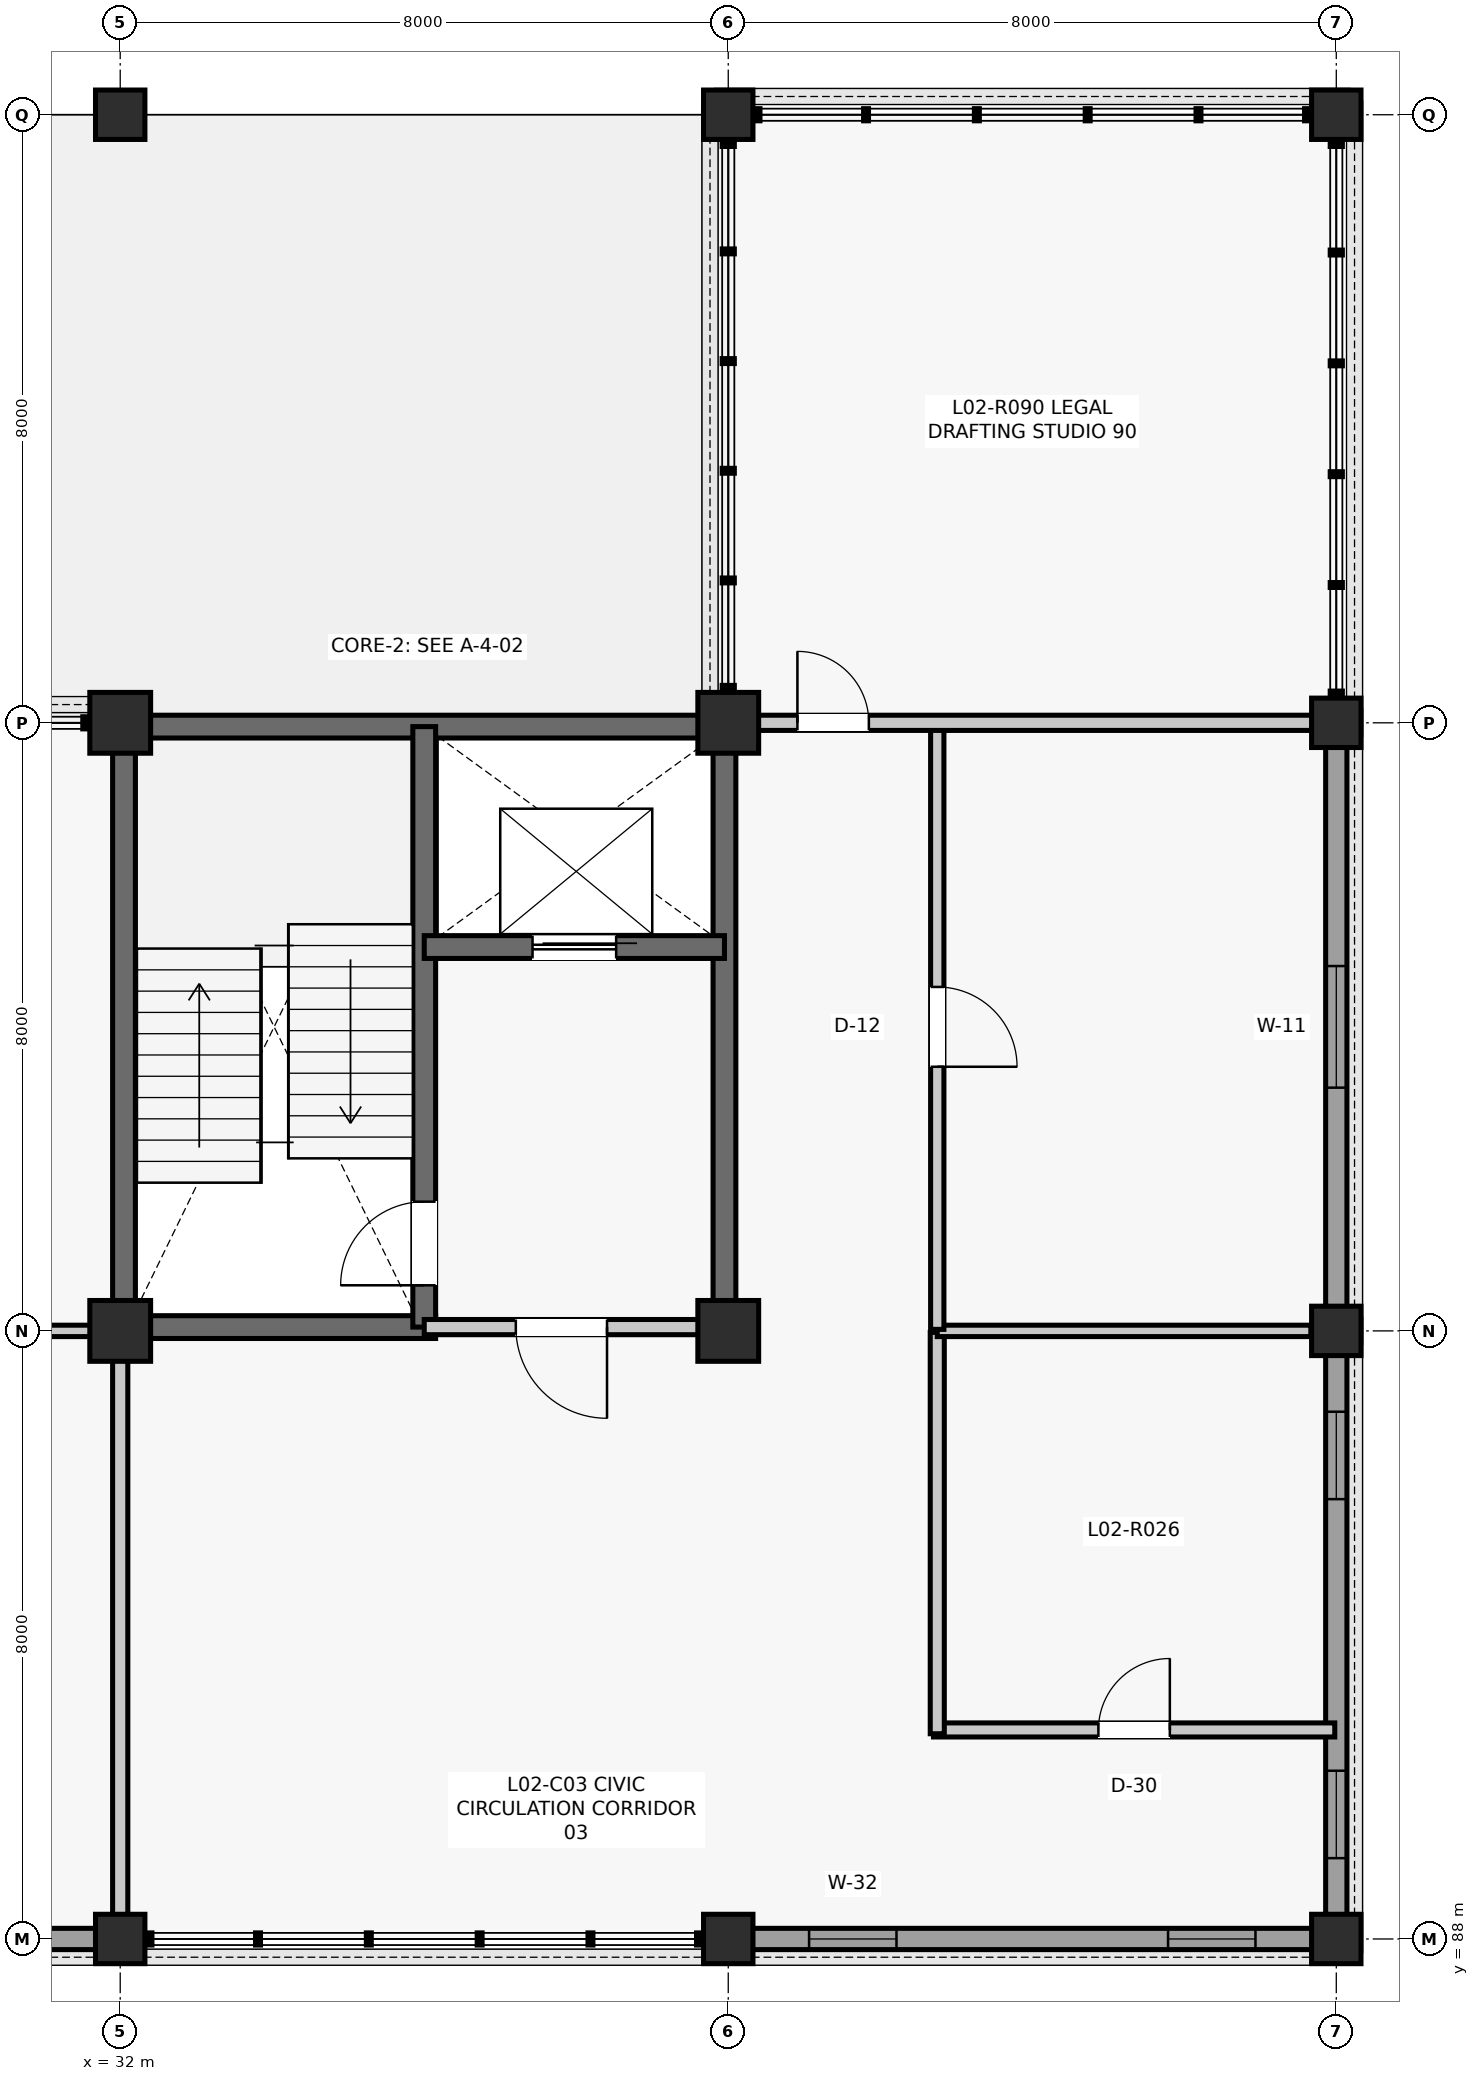
"""IFC4 building model, lengths in metres.
Left out: names, types, materials, properties, quantities, classifications, styles, units other than length and angle.
Written with IfcOpenShell. Run it as: python <this file> out.ifc"""

import sys

from ifc_helpers import new_model, si_unit, direction, frame, frame_2d, origin, origin_2d, place, context, subcontext, project, spatial, rectangle, extrude, element, fill, save


model = new_model("IFC4")
c1 = context("Model", 3, precision=1e-05, world=origin(), true_north=direction((0.0, 1.0)))
c2 = subcontext(c1, "Body", "Model", "MODEL_VIEW")
j1 = project(units=[si_unit("LENGTHUNIT", "METRE"), si_unit("PLANEANGLEUNIT", "RADIAN")], contexts=[c1])
p1 = place(None, origin())
s1 = spatial("IfcSite", under=j1, at=p1, CompositionType="ELEMENT")
p2 = place(p1, origin())
s2 = spatial("IfcBuilding", under=s1, at=p2, CompositionType="ELEMENT")
p3 = place(p2, frame((0.0, 0.0, 9.9)))
s3 = spatial("IfcBuildingStorey", under=s2, at=p3, CompositionType="ELEMENT", Elevation=9.9)
p4 = place(p3, frame((32.0, 88.0, 0.0), z_axis=(0.0, 0.0, 1.0), x_axis=(1.0, 0.0, 0.0)))
e1 = element("IfcColumn", 1, at=p4, inside=s3, PredefinedType="COLUMN", context=c2, shape_type="SweptSolid", body=[
    extrude(rectangle(XDim=0.65, YDim=0.65, at=origin_2d()), origin(), (0.0, 0.0, 1.0), 3.96),
])
for number, where, z_axis, x_axis in (
    (2, (32.0, 96.0, 0.0), (0.0, 0.0, 1.0), (1.0, 0.0, 0.0)),
    (3, (32.0, 104.0, 0.0), (0.0, 0.0, 1.0), (1.0, 0.0, 0.0)),
):
    element("IfcColumn", number, at=place(p3, frame(where, z_axis=z_axis, x_axis=x_axis)), inside=s3, PredefinedType="COLUMN", context=c2, shape_type="SweptSolid", body=[
        extrude(rectangle(XDim=0.8, YDim=0.8, at=origin_2d()), origin(), (0.0, 0.0, 1.0), 3.96),
    ])
for number, where, z_axis, x_axis in (
    (4, (32.0, 112.0, 0.0), (0.0, 0.0, 1.0), (1.0, 0.0, 0.0)),
    (5, (40.0, 88.0, 0.0), (0.0, 0.0, 1.0), (1.0, 0.0, 0.0)),
):
    element("IfcColumn", number, at=place(p3, frame(where, z_axis=z_axis, x_axis=x_axis)), inside=s3, PredefinedType="COLUMN", context=c2, shape_type="SweptSolid", body=[
        extrude(rectangle(XDim=0.65, YDim=0.65, at=origin_2d()), origin(), (0.0, 0.0, 1.0), 3.96),
    ])
for number, where, z_axis, x_axis in (
    (6, (40.0, 96.0, 0.0), (0.0, 0.0, 1.0), (1.0, 0.0, 0.0)),
    (7, (40.0, 104.0, 0.0), (0.0, 0.0, 1.0), (1.0, 0.0, 0.0)),
):
    element("IfcColumn", number, at=place(p3, frame(where, z_axis=z_axis, x_axis=x_axis)), inside=s3, PredefinedType="COLUMN", context=c2, shape_type="SweptSolid", body=[
        extrude(rectangle(XDim=0.8, YDim=0.8, at=origin_2d()), origin(), (0.0, 0.0, 1.0), 3.96),
    ])
for number, where, z_axis, x_axis in (
    (8, (40.0, 112.0, 0.0), (0.0, 0.0, 1.0), (1.0, 0.0, 0.0)),
    (9, (48.0, 88.0, 0.0), (0.0, 0.0, 1.0), (1.0, 0.0, 0.0)),
    (10, (48.0, 96.0, 0.0), (0.0, 0.0, 1.0), (1.0, 0.0, 0.0)),
    (11, (48.0, 104.0, 0.0), (0.0, 0.0, 1.0), (1.0, 0.0, 0.0)),
    (12, (48.0, 112.0, 0.0), (0.0, 0.0, 1.0), (1.0, 0.0, 0.0)),
):
    element("IfcColumn", number, at=place(p3, frame(where, z_axis=z_axis, x_axis=x_axis)), inside=s3, PredefinedType="COLUMN", context=c2, shape_type="SweptSolid", body=[
        extrude(rectangle(XDim=0.65, YDim=0.65, at=origin_2d()), origin(), (0.0, 0.0, 1.0), 3.96),
    ])
p5 = place(p3, frame((24.31, 88.0, 0.0), z_axis=(0.0, 0.0, 1.0), x_axis=(1.0, 0.0, 0.0)))
e13 = element("IfcWall", 13, at=p5, inside=s3, PredefinedType="SOLIDWALL", context=c2, shape_type="SweptSolid", body=[
    extrude(rectangle(XDim=7.38, YDim=0.28, at=frame_2d((3.69, 0.0))), origin(), (0.0, 0.0, 1.0), 3.28),
])
p6 = place(p5, frame((3.015, 0.0, 0.9)))
e14 = element("IfcOpeningElement", 14, at=p6, cuts=e13, PredefinedType="OPENING", context=c2, shape_type="SweptSolid", body=[
    extrude(rectangle(XDim=1.35, YDim=1.9, at=frame_2d((0.675, 0.95))), frame((0.0, 0.15, 0.0), z_axis=(0.0, -1.0, 0.0), x_axis=(1.0, 0.0, 0.0)), (0.0, 0.0, 1.0), 0.3),
])
p7 = place(p3, frame((40.31, 88.0, 0.0), z_axis=(0.0, 0.0, 1.0), x_axis=(1.0, 0.0, 0.0)))
e15 = element("IfcWall", 15, at=p7, inside=s3, PredefinedType="SOLIDWALL", context=c2, shape_type="SweptSolid", body=[
    extrude(rectangle(XDim=7.38, YDim=0.28, at=frame_2d((3.69, 0.0))), origin(), (0.0, 0.0, 1.0), 3.284),
])
p8 = place(p7, frame((0.753, 0.0, 0.95)))
e16 = element("IfcOpeningElement", 16, at=p8, cuts=e15, PredefinedType="OPENING", context=c2, shape_type="SweptSolid", body=[
    extrude(rectangle(XDim=1.15, YDim=1.65, at=frame_2d((0.575, 0.825))), frame((0.0, 0.15, 0.0), z_axis=(0.0, -1.0, 0.0), x_axis=(1.0, 0.0, 0.0)), (0.0, 0.0, 1.0), 0.3),
])
p9 = place(p7, frame((5.477, 0.0, 0.95)))
e17 = element("IfcOpeningElement", 17, at=p9, cuts=e15, PredefinedType="OPENING", context=c2, shape_type="SweptSolid", body=[
    extrude(rectangle(XDim=1.15, YDim=1.65, at=frame_2d((0.575, 0.825))), frame((0.0, 0.15, 0.0), z_axis=(0.0, -1.0, 0.0), x_axis=(1.0, 0.0, 0.0)), (0.0, 0.0, 1.0), 0.3),
])
p10 = place(p3, frame((48.0, 88.31, 0.0), z_axis=(0.0, 0.0, 1.0), x_axis=(0.0, 1.0, 0.0)))
e18 = element("IfcWall", 18, at=p10, inside=s3, PredefinedType="SOLIDWALL", context=c2, shape_type="SweptSolid", body=[
    extrude(rectangle(XDim=7.38, YDim=0.28, at=frame_2d((3.69, 0.0))), origin(), (0.0, 0.0, 1.0), 3.347),
])
p11 = place(p10, frame((0.753, 0.0, 0.95)))
e19 = element("IfcOpeningElement", 19, at=p11, cuts=e18, PredefinedType="OPENING", context=c2, shape_type="SweptSolid", body=[
    extrude(rectangle(XDim=1.15, YDim=1.65, at=frame_2d((0.575, 0.825))), frame((0.0, 0.15, 0.0), z_axis=(0.0, -1.0, 0.0), x_axis=(1.0, 0.0, 0.0)), (0.0, 0.0, 1.0), 0.3),
])
p12 = place(p10, frame((5.477, 0.0, 0.95)))
e20 = element("IfcOpeningElement", 20, at=p12, cuts=e18, PredefinedType="OPENING", context=c2, shape_type="SweptSolid", body=[
    extrude(rectangle(XDim=1.15, YDim=1.65, at=frame_2d((0.575, 0.825))), frame((0.0, 0.15, 0.0), z_axis=(0.0, -1.0, 0.0), x_axis=(1.0, 0.0, 0.0)), (0.0, 0.0, 1.0), 0.3),
])
p13 = place(p3, frame((48.0, 96.31, 0.0), z_axis=(0.0, 0.0, 1.0), x_axis=(0.0, 1.0, 0.0)))
e21 = element("IfcWall", 21, at=p13, inside=s3, PredefinedType="SOLIDWALL", context=c2, shape_type="SweptSolid", body=[
    extrude(rectangle(XDim=7.38, YDim=0.28, at=frame_2d((3.69, 0.0))), origin(), (0.0, 0.0, 1.0), 3.28),
])
p14 = place(p13, frame((2.89, 0.0, 0.9)))
e22 = element("IfcOpeningElement", 22, at=p14, cuts=e21, PredefinedType="OPENING", context=c2, shape_type="SweptSolid", body=[
    extrude(rectangle(XDim=1.6, YDim=2.0, at=frame_2d((0.8, 1.0))), frame((0.0, 0.15, 0.0), z_axis=(0.0, -1.0, 0.0), x_axis=(1.0, 0.0, 0.0)), (0.0, 0.0, 1.0), 0.3),
])
for number, where, z_axis, x_axis in (
    (23, (32.05, 96.29, 0.0), (0.0, 0.0, 1.0), (0.0, 1.0, 0.0)),
    (24, (32.29, 103.95, 0.0), (0.0, 0.0, 1.0), (1.0, 0.0, 0.0)),
    (25, (39.95, 96.29, 0.0), (0.0, 0.0, 1.0), (0.0, 1.0, 0.0)),
):
    element("IfcWall", number, at=place(p3, frame(where, z_axis=z_axis, x_axis=x_axis)), inside=s3, PredefinedType="SHEAR", context=c2, shape_type="SweptSolid", body=[
        extrude(rectangle(XDim=7.42, YDim=0.3, at=frame_2d((3.71, 0.0))), origin(), (0.0, 0.0, 1.0), 3.705),
    ])
p15 = place(p3, frame((32.29, 96.05, 0.0), z_axis=(0.0, 0.0, 1.0), x_axis=(1.0, 0.0, 0.0)))
e26 = element("IfcWall", 26, at=p15, inside=s3, PredefinedType="SHEAR", context=c2, shape_type="SweptSolid", body=[
    extrude(rectangle(XDim=3.86, YDim=0.3, at=frame_2d((1.93, 0.0))), origin(), (0.0, 0.0, 1.0), 3.705),
])
p16 = place(p3, frame((36.0, 96.05, 0.0), z_axis=(0.0, 0.0, 1.0), x_axis=(0.0, 1.0, 0.0)))
e27 = element("IfcWall", 27, at=p16, inside=s3, PredefinedType="SHEAR", context=c2, shape_type="SweptSolid", body=[
    extrude(rectangle(XDim=7.9, YDim=0.3, at=frame_2d((3.95, 0.0))), origin(), (0.0, 0.0, 1.0), 3.705),
])
p17 = place(p16, frame((0.55, 0.0, 0.0)))
e28 = element("IfcOpeningElement", 28, at=p17, cuts=e27, PredefinedType="OPENING", context=c2, shape_type="SweptSolid", body=[
    extrude(rectangle(XDim=1.1, YDim=2.15, at=frame_2d((0.55, 1.075))), frame((0.0, 0.16, 0.0), z_axis=(0.0, -1.0, 0.0), x_axis=(1.0, 0.0, 0.0)), (0.0, 0.0, 1.0), 0.32),
])
p18 = place(p3, frame((36.0, 101.05, 0.0), z_axis=(0.0, 0.0, 1.0), x_axis=(1.0, 0.0, 0.0)))
e29 = element("IfcWall", 29, at=p18, inside=s3, PredefinedType="SHEAR", context=c2, shape_type="SweptSolid", body=[
    extrude(rectangle(XDim=3.95, YDim=0.3, at=frame_2d((1.975, 0.0))), origin(), (0.0, 0.0, 1.0), 3.705),
])
p19 = place(p18, frame((1.425, 0.0, 0.0)))
e30 = element("IfcOpeningElement", 30, at=p19, cuts=e29, PredefinedType="OPENING", context=c2, shape_type="SweptSolid", body=[
    extrude(rectangle(XDim=1.1, YDim=2.2, at=frame_2d((0.55, 1.1))), frame((0.0, 0.16, 0.0), z_axis=(0.0, -1.0, 0.0), x_axis=(1.0, 0.0, 0.0)), (0.0, 0.0, 1.0), 0.32),
])
p20 = place(p3, frame((36.0, 96.05, 0.0), z_axis=(0.0, 0.0, 1.0), x_axis=(1.0, 0.0, 0.0)))
e31 = element("IfcWall", 31, at=p20, inside=s3, PredefinedType="PARTITIONING", context=c2, shape_type="SweptSolid", body=[
    extrude(rectangle(XDim=3.61, YDim=0.2, at=frame_2d((1.805, 0.0))), origin(), (0.0, 0.0, 1.0), 3.082),
])
p21 = place(p20, frame((1.205, 0.0, 0.0)))
e32 = element("IfcOpeningElement", 32, at=p21, cuts=e31, PredefinedType="OPENING", context=c2, shape_type="SweptSolid", body=[
    extrude(rectangle(XDim=1.2, YDim=2.15, at=frame_2d((0.6, 1.075))), frame((0.0, 0.11, 0.0), z_axis=(0.0, -1.0, 0.0), x_axis=(1.0, 0.0, 0.0)), (0.0, 0.0, 1.0), 0.22),
])
p22 = place(p3, frame((42.7, 90.75, 0.0), z_axis=(0.0, 0.0, 1.0), x_axis=(1.0, 0.0, 0.0)))
e33 = element("IfcWall", 33, at=p22, inside=s3, PredefinedType="PARTITIONING", context=c2, shape_type="SweptSolid", body=[
    extrude(rectangle(XDim=5.28, YDim=0.185, at=frame_2d((2.64, 0.0))), origin(), (0.0, 0.0, 1.0), 3.34),
])
p23 = place(p22, frame((2.17, 0.0, 0.0)))
e34 = element("IfcOpeningElement", 34, at=p23, cuts=e33, PredefinedType="OPENING", context=c2, shape_type="SweptSolid", body=[
    extrude(rectangle(XDim=0.94, YDim=2.12, at=frame_2d((0.47, 1.06))), frame((0.0, 0.103, 0.0), z_axis=(0.0, -1.0, 0.0), x_axis=(1.0, 0.0, 0.0)), (0.0, 0.0, 1.0), 0.205),
])
p24 = place(p3, frame((42.75, 90.7, 0.0), z_axis=(0.0, 0.0, 1.0), x_axis=(0.0, 1.0, 0.0)))
e35 = element("IfcWall", 35, at=p24, inside=s3, PredefinedType="PARTITIONING", context=c2, shape_type="SweptSolid", body=[
    extrude(rectangle(XDim=5.28, YDim=0.185, at=frame_2d((2.64, 0.0))), origin(), (0.0, 0.0, 1.0), 3.157),
])
p25 = place(p3, frame((42.75, 96.0, 0.0), z_axis=(0.0, 0.0, 1.0), x_axis=(1.0, 0.0, 0.0)))
e36 = element("IfcWall", 36, at=p25, inside=s3, PredefinedType="PARTITIONING", context=c2, shape_type="SweptSolid", body=[
    extrude(rectangle(XDim=4.915, YDim=0.15, at=frame_2d((2.458, 0.0))), origin(), (0.0, 0.0, 1.0), 3.157),
])
p26 = place(p3, frame((42.75, 96.02, 0.0), z_axis=(0.0, 0.0, 1.0), x_axis=(0.0, 1.0, 0.0)))
e37 = element("IfcWall", 37, at=p26, inside=s3, PredefinedType="PARTITIONING", context=c2, shape_type="SweptSolid", body=[
    extrude(rectangle(XDim=7.96, YDim=0.175, at=frame_2d((3.98, 0.0))), origin(), (0.0, 0.0, 1.0), 3.141),
])
p27 = place(p26, frame((3.455, 0.0, 0.0)))
e38 = element("IfcOpeningElement", 38, at=p27, cuts=e37, PredefinedType="OPENING", context=c2, shape_type="SweptSolid", body=[
    extrude(rectangle(XDim=1.05, YDim=2.15, at=frame_2d((0.525, 1.075))), frame((0.0, 0.097, 0.0), z_axis=(0.0, -1.0, 0.0), x_axis=(1.0, 0.0, 0.0)), (0.0, 0.0, 1.0), 0.195),
])
p28 = place(p3, frame((32.0, 88.315, 0.0), z_axis=(0.0, 0.0, 1.0), x_axis=(0.0, 1.0, 0.0)))
e39 = element("IfcWall", 39, at=p28, inside=s3, PredefinedType="PARTITIONING", context=c2, shape_type="SweptSolid", body=[
    extrude(rectangle(XDim=7.295, YDim=0.2, at=frame_2d((3.647, 0.0))), origin(), (0.0, 0.0, 1.0), 3.221),
])
p29 = place(p3, frame((24.315, 96.0, 0.0), z_axis=(0.0, 0.0, 1.0), x_axis=(1.0, 0.0, 0.0)))
e40 = element("IfcWall", 40, at=p29, inside=s3, PredefinedType="PARTITIONING", context=c2, shape_type="SweptSolid", body=[
    extrude(rectangle(XDim=7.295, YDim=0.15, at=frame_2d((3.647, 0.0))), origin(), (0.0, 0.0, 1.0), 3.151),
])
p30 = place(p3, frame((40.39, 104.0, 0.0), z_axis=(0.0, 0.0, 1.0), x_axis=(1.0, 0.0, 0.0)))
e41 = element("IfcWall", 41, at=p30, inside=s3, PredefinedType="PARTITIONING", context=c2, shape_type="SweptSolid", body=[
    extrude(rectangle(XDim=7.295, YDim=0.2, at=frame_2d((3.647, 0.0))), origin(), (0.0, 0.0, 1.0), 3.141),
])
p31 = place(p30, frame((0.52, 0.0, 0.0)))
e42 = element("IfcOpeningElement", 42, at=p31, cuts=e41, PredefinedType="OPENING", context=c2, shape_type="SweptSolid", body=[
    extrude(rectangle(XDim=0.94, YDim=2.12, at=frame_2d((0.47, 1.06))), frame((0.0, 0.11, 0.0), z_axis=(0.0, -1.0, 0.0), x_axis=(1.0, 0.0, 0.0)), (0.0, 0.0, 1.0), 0.22),
])
p32 = place(p8, origin())
e43 = element("IfcWindow", 43, at=p32, inside=s3, PartitioningType="SINGLE_PANEL", PredefinedType="WINDOW", context=c2, shape_type="SweptSolid", body=[
    extrude(rectangle(XDim=1.15, YDim=1.65, at=frame_2d((0.575, 0.825))), frame((0.0, 0.03, 0.0), z_axis=(0.0, -1.0, 0.0), x_axis=(1.0, 0.0, 0.0)), (0.0, 0.0, 1.0), 0.06),
])
fill(e16, e43)
p33 = place(p9, origin())
e44 = element("IfcWindow", 44, at=p33, inside=s3, PartitioningType="SINGLE_PANEL", PredefinedType="WINDOW", context=c2, shape_type="SweptSolid", body=[
    extrude(rectangle(XDim=1.15, YDim=1.65, at=frame_2d((0.575, 0.825))), frame((0.0, 0.03, 0.0), z_axis=(0.0, -1.0, 0.0), x_axis=(1.0, 0.0, 0.0)), (0.0, 0.0, 1.0), 0.06),
])
fill(e17, e44)
p34 = place(p11, origin())
e45 = element("IfcWindow", 45, at=p34, inside=s3, PartitioningType="SINGLE_PANEL", PredefinedType="WINDOW", context=c2, shape_type="SweptSolid", body=[
    extrude(rectangle(XDim=1.15, YDim=1.65, at=frame_2d((0.575, 0.825))), frame((0.0, 0.03, 0.0), z_axis=(0.0, -1.0, 0.0), x_axis=(1.0, 0.0, 0.0)), (0.0, 0.0, 1.0), 0.06),
])
fill(e19, e45)
p35 = place(p12, origin())
e46 = element("IfcWindow", 46, at=p35, inside=s3, PartitioningType="SINGLE_PANEL", PredefinedType="WINDOW", context=c2, shape_type="SweptSolid", body=[
    extrude(rectangle(XDim=1.15, YDim=1.65, at=frame_2d((0.575, 0.825))), frame((0.0, 0.03, 0.0), z_axis=(0.0, -1.0, 0.0), x_axis=(1.0, 0.0, 0.0)), (0.0, 0.0, 1.0), 0.06),
])
fill(e20, e46)
p36 = place(p14, origin())
e47 = element("IfcWindow", 47, at=p36, inside=s3, PartitioningType="SINGLE_PANEL", PredefinedType="WINDOW", context=c2, shape_type="SweptSolid", body=[
    extrude(rectangle(XDim=1.6, YDim=2.0, at=frame_2d((0.8, 1.0))), frame((0.0, 0.03, 0.0), z_axis=(0.0, -1.0, 0.0), x_axis=(1.0, 0.0, 0.0)), (0.0, 0.0, 1.0), 0.06),
])
fill(e22, e47)
p37 = place(p17, origin())
e48 = element("IfcDoor", 48, at=p37, inside=s3, OperationType="SINGLE_SWING_LEFT", PredefinedType="DOOR", context=c2, shape_type="SweptSolid", body=[
    extrude(rectangle(XDim=1.1, YDim=2.15, at=frame_2d((0.55, 1.075))), frame((0.0, 0.025, 0.0), z_axis=(0.0, -1.0, 0.0), x_axis=(1.0, 0.0, 0.0)), (0.0, 0.0, 1.0), 0.05),
])
fill(e28, e48)
p38 = place(p19, origin())
e49 = element("IfcDoor", 49, at=p38, inside=s3, OperationType="SLIDING_TO_LEFT", PredefinedType="DOOR", context=c2, shape_type="SweptSolid", body=[
    extrude(rectangle(XDim=1.1, YDim=2.2, at=frame_2d((0.55, 1.1))), frame((0.0, 0.025, 0.0), z_axis=(0.0, -1.0, 0.0), x_axis=(1.0, 0.0, 0.0)), (0.0, 0.0, 1.0), 0.05),
])
fill(e30, e49)
p39 = place(p21, frame((1.2, 0.0, 0.0), z_axis=(0.0, 0.0, 1.0), x_axis=(-1.0, 0.0, 0.0)))
e50 = element("IfcDoor", 50, at=p39, inside=s3, OperationType="SINGLE_SWING_RIGHT", PredefinedType="DOOR", context=c2, shape_type="SweptSolid", body=[
    extrude(rectangle(XDim=1.2, YDim=2.15, at=frame_2d((0.6, 1.075))), frame((0.0, 0.025, 0.0), z_axis=(0.0, -1.0, 0.0), x_axis=(1.0, 0.0, 0.0)), (0.0, 0.0, 1.0), 0.05),
])
fill(e32, e50)
p40 = place(p23, origin())
e51 = element("IfcDoor", 51, at=p40, inside=s3, OperationType="SINGLE_SWING_RIGHT", PredefinedType="DOOR", context=c2, shape_type="SweptSolid", body=[
    extrude(rectangle(XDim=0.94, YDim=2.12, at=frame_2d((0.47, 1.06))), frame((0.0, 0.025, 0.0), z_axis=(0.0, -1.0, 0.0), x_axis=(1.0, 0.0, 0.0)), (0.0, 0.0, 1.0), 0.05),
])
fill(e34, e51)
p41 = place(p27, frame((1.05, 0.0, 0.0), z_axis=(0.0, 0.0, 1.0), x_axis=(-1.0, 0.0, 0.0)))
e52 = element("IfcDoor", 52, at=p41, inside=s3, OperationType="SINGLE_SWING_LEFT", PredefinedType="DOOR", context=c2, shape_type="SweptSolid", body=[
    extrude(rectangle(XDim=1.05, YDim=2.15, at=frame_2d((0.525, 1.075))), frame((0.0, 0.025, 0.0), z_axis=(0.0, -1.0, 0.0), x_axis=(1.0, 0.0, 0.0)), (0.0, 0.0, 1.0), 0.05),
])
fill(e38, e52)
p42 = place(p31, origin())
e53 = element("IfcDoor", 53, at=p42, inside=s3, OperationType="SINGLE_SWING_LEFT", PredefinedType="DOOR", context=c2, shape_type="SweptSolid", body=[
    extrude(rectangle(XDim=0.94, YDim=2.12, at=frame_2d((0.47, 1.06))), frame((0.0, 0.025, 0.0), z_axis=(0.0, -1.0, 0.0), x_axis=(1.0, 0.0, 0.0)), (0.0, 0.0, 1.0), 0.05),
])
fill(e42, e53)
save(model, sys.argv[1])
